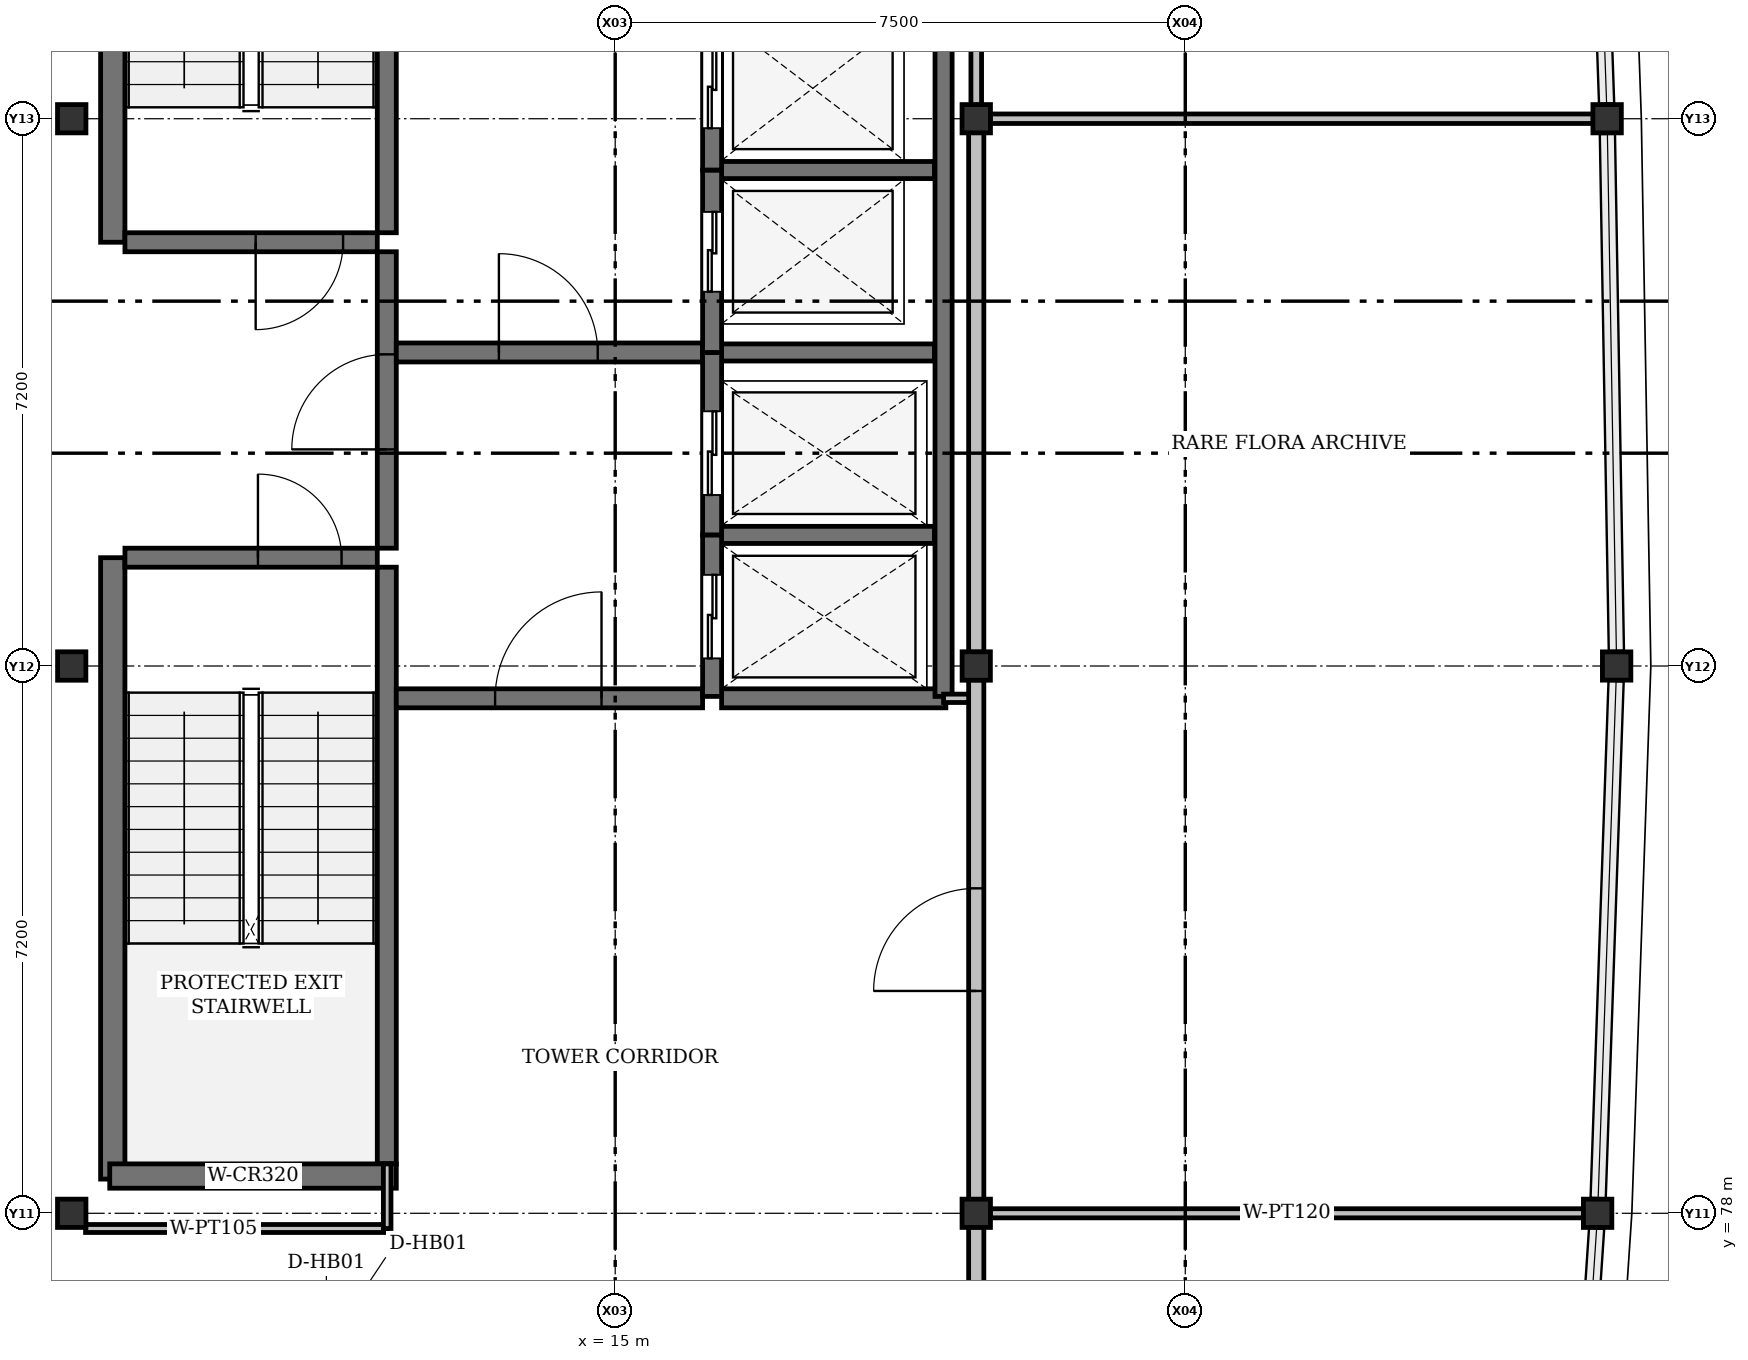
"""IFC4 building model, lengths in metres.
Left out: names, types, materials, properties, quantities, classifications, styles, units other than length and angle.
Written with IfcOpenShell. Run it as: python <this file> out.ifc"""

import sys

from ifc_helpers import new_model, si_unit, direction, frame, frame_2d, origin, origin_2d, place, context, subcontext, project, spatial, rectangle, i_section, extrude, element, fill, save


model = new_model("IFC4")
c1 = context("Model", 3, precision=1e-05, world=origin(), true_north=direction((0.0, 1.0)))
c2 = subcontext(c1, "Body", "Model", "MODEL_VIEW")
j1 = project(units=[si_unit("LENGTHUNIT", "METRE"), si_unit("PLANEANGLEUNIT", "RADIAN")], contexts=[c1])
p1 = place(None, origin())
s1 = spatial("IfcSite", under=j1, at=p1, CompositionType="ELEMENT")
p2 = place(p1, origin())
s2 = spatial("IfcBuilding", under=s1, at=p2, CompositionType="ELEMENT")
p3 = place(p2, frame((0.0, 0.0, 26.7)))
s3 = spatial("IfcBuildingStorey", under=s2, at=p3, CompositionType="ELEMENT", Elevation=26.7)
for number, where, z_axis, x_axis in (
    (1, (7.85, 78.0, 0.0), (0.0, 0.0, 1.0), (1.0, 0.0, 0.0)),
    (2, (19.75, 78.0, 0.0), (0.0, 0.0, 1.0), (1.0, 0.0, 0.0)),
    (3, (27.925, 78.0, 0.0), (0.0, 0.0, 1.0), (1.0, 0.0, 0.0)),
    (4, (7.85, 85.2, 0.0), (0.0, 0.0, 1.0), (0.0, 1.0, 0.0)),
    (5, (19.75, 85.2, 0.0), (0.0, 0.0, 1.0), (0.0, 1.0, 0.0)),
    (6, (28.175, 85.2, 0.0), (0.0, 0.0, 1.0), (1.0, 0.0, 0.0)),
    (7, (7.85, 92.4, 0.0), (0.0, 0.0, 1.0), (1.0, 0.0, 0.0)),
    (8, (19.75, 92.4, 0.0), (0.0, 0.0, 1.0), (1.0, 0.0, 0.0)),
    (9, (28.05, 92.4, 0.0), (0.0, 0.0, 1.0), (1.0, 0.0, 0.0)),
):
    element("IfcColumn", number, at=place(p3, frame(where, z_axis=z_axis, x_axis=x_axis)), inside=s3, PredefinedType="COLUMN", context=c2, shape_type="SweptSolid", body=[
        extrude(i_section(OverallWidth=0.374, OverallDepth=0.372, WebThickness=0.016, FlangeThickness=0.026, FilletRadius=0.015, at=origin_2d()), origin(), (0.0, 0.0, 1.0), 4.2),
    ])
for number, where, z_axis, x_axis in (
    (10, (8.39, 78.45, 0.0), (0.0, 0.0, 1.0), (0.0, 1.0, 0.0)),
    (11, (8.39, 90.775, 0.0), (0.0, 0.0, 1.0), (0.0, 1.0, 0.0)),
):
    element("IfcWall", number, at=place(p3, frame(where, z_axis=z_axis, x_axis=x_axis)), inside=s3, PredefinedType="SHEAR", context=c2, shape_type="SweptSolid", body=[
        extrude(rectangle(XDim=8.175, YDim=0.32, at=frame_2d((4.087, 0.0))), origin(), (0.0, 0.0, 1.0), 4.2),
    ])
for number, where, z_axis, x_axis in (
    (12, (11.995, 78.65, 0.0), (0.0, 0.0, 1.0), (0.0, 1.0, 0.0)),
    (13, (11.995, 90.9, 0.0), (0.0, 0.0, 1.0), (0.0, 1.0, 0.0)),
):
    element("IfcWall", number, at=place(p3, frame(where, z_axis=z_axis, x_axis=x_axis)), inside=s3, PredefinedType="SHEAR", context=c2, shape_type="SweptSolid", body=[
        extrude(rectangle(XDim=7.85, YDim=0.25, at=frame_2d((3.925, 0.0))), origin(), (0.0, 0.0, 1.0), 4.2),
    ])
p4 = place(p3, frame((11.995, 86.75, 0.0), z_axis=(0.0, 0.0, 1.0), x_axis=(0.0, 1.0, 0.0)))
e14 = element("IfcWall", 14, at=p4, inside=s3, PredefinedType="SHEAR", context=c2, shape_type="SweptSolid", body=[
    extrude(rectangle(XDim=3.9, YDim=0.25, at=frame_2d((1.95, 0.0))), origin(), (0.0, 0.0, 1.0), 4.2),
])
p5 = place(p4, frame((1.3, 0.0, 0.0)))
e15 = element("IfcOpeningElement", 15, at=p5, cuts=e14, PredefinedType="OPENING", context=c2, shape_type="SweptSolid", body=[
    extrude(rectangle(XDim=1.25, YDim=2.2, at=frame_2d((0.625, 1.1))), frame((0.0, 0.125, 0.0), z_axis=(0.0, -1.0, 0.0), x_axis=(1.0, 0.0, 0.0)), (0.0, 0.0, 1.0), 0.25),
])
p6 = place(p3, frame((8.35, 78.49, 0.0), z_axis=(0.0, 0.0, 1.0), x_axis=(1.0, 0.0, 0.0)))
e16 = element("IfcWall", 16, at=p6, inside=s3, PredefinedType="SHEAR", context=c2, shape_type="SweptSolid", body=[
    extrude(rectangle(XDim=3.77, YDim=0.32, at=frame_2d((1.885, 0.0))), origin(), (0.0, 0.0, 1.0), 4.2),
])
p7 = place(p3, frame((8.55, 86.625, 0.0), z_axis=(0.0, 0.0, 1.0), x_axis=(1.0, 0.0, 0.0)))
e17 = element("IfcWall", 17, at=p7, inside=s3, PredefinedType="SHEAR", context=c2, shape_type="SweptSolid", body=[
    extrude(rectangle(XDim=3.32, YDim=0.25, at=frame_2d((1.66, 0.0))), origin(), (0.0, 0.0, 1.0), 4.2),
])
p8 = place(p7, frame((1.75, 0.0, 0.0)))
e18 = element("IfcOpeningElement", 18, at=p8, cuts=e17, PredefinedType="OPENING", context=c2, shape_type="SweptSolid", body=[
    extrude(rectangle(XDim=1.1, YDim=2.15, at=frame_2d((0.55, 1.075))), frame((0.0, 0.125, 0.0), z_axis=(0.0, -1.0, 0.0), x_axis=(1.0, 0.0, 0.0)), (0.0, 0.0, 1.0), 0.25),
])
p9 = place(p3, frame((11.87, 90.775, 0.0), z_axis=(0.0, 0.0, 1.0), x_axis=(-1.0, 0.0, 0.0)))
e19 = element("IfcWall", 19, at=p9, inside=s3, PredefinedType="SHEAR", context=c2, shape_type="SweptSolid", body=[
    extrude(rectangle(XDim=3.32, YDim=0.25, at=frame_2d((1.66, 0.0))), origin(), (0.0, 0.0, 1.0), 4.2),
])
p10 = place(p9, frame((0.45, 0.0, 0.0)))
e20 = element("IfcOpeningElement", 20, at=p10, cuts=e19, PredefinedType="OPENING", context=c2, shape_type="SweptSolid", body=[
    extrude(rectangle(XDim=1.15, YDim=2.15, at=frame_2d((0.575, 1.075))), frame((0.0, 0.125, 0.0), z_axis=(0.0, -1.0, 0.0), x_axis=(1.0, 0.0, 0.0)), (0.0, 0.0, 1.0), 0.25),
])
p11 = place(p3, frame((12.12, 89.325, 0.0), z_axis=(0.0, 0.0, 1.0), x_axis=(1.0, 0.0, 0.0)))
e21 = element("IfcWall", 21, at=p11, inside=s3, PredefinedType="SHEAR", context=c2, shape_type="SweptSolid", body=[
    extrude(rectangle(XDim=4.03, YDim=0.25, at=frame_2d((2.015, 0.0))), origin(), (0.0, 0.0, 1.0), 4.2),
])
p12 = place(p11, frame((1.35, 0.0, 0.0)))
e22 = element("IfcOpeningElement", 22, at=p12, cuts=e21, PredefinedType="OPENING", context=c2, shape_type="SweptSolid", body=[
    extrude(rectangle(XDim=1.3, YDim=2.2, at=frame_2d((0.65, 1.1))), frame((0.0, 0.125, 0.0), z_axis=(0.0, -1.0, 0.0), x_axis=(1.0, 0.0, 0.0)), (0.0, 0.0, 1.0), 0.25),
])
p13 = place(p3, frame((12.12, 84.775, 0.0), z_axis=(0.0, 0.0, 1.0), x_axis=(1.0, 0.0, 0.0)))
e23 = element("IfcWall", 23, at=p13, inside=s3, PredefinedType="SHEAR", context=c2, shape_type="SweptSolid", body=[
    extrude(rectangle(XDim=4.03, YDim=0.25, at=frame_2d((2.015, 0.0))), origin(), (0.0, 0.0, 1.0), 4.2),
])
p14 = place(p13, frame((1.3, 0.0, 0.0)))
e24 = element("IfcOpeningElement", 24, at=p14, cuts=e23, PredefinedType="OPENING", context=c2, shape_type="SweptSolid", body=[
    extrude(rectangle(XDim=1.4, YDim=2.25, at=frame_2d((0.7, 1.125))), frame((0.0, 0.125, 0.0), z_axis=(0.0, -1.0, 0.0), x_axis=(1.0, 0.0, 0.0)), (0.0, 0.0, 1.0), 0.25),
])
p15 = place(p3, frame((16.4, 84.775, 0.0), z_axis=(0.0, 0.0, 1.0), x_axis=(1.0, 0.0, 0.0)))
e25 = element("IfcWall", 25, at=p15, inside=s3, PredefinedType="SHEAR", context=c2, shape_type="SweptSolid", body=[
    extrude(rectangle(XDim=2.95, YDim=0.25, at=frame_2d((1.475, 0.0))), origin(), (0.0, 0.0, 1.0), 4.2),
])
p16 = place(p3, frame((19.32, 84.8, 0.0), z_axis=(0.0, 0.0, 1.0), x_axis=(0.0, 1.0, 0.0)))
e26 = element("IfcWall", 26, at=p16, inside=s3, PredefinedType="SHEAR", context=c2, shape_type="SweptSolid", body=[
    extrude(rectangle(XDim=13.95, YDim=0.225, at=frame_2d((6.975, 0.0))), origin(), (0.0, 0.0, 1.0), 4.2),
])
for number, where, z_axis, x_axis in (
    (27, (16.4, 86.925, 0.0), (0.0, 0.0, 1.0), (1.0, 0.0, 0.0)),
    (28, (16.4, 89.325, 0.0), (0.0, 0.0, 1.0), (1.0, 0.0, 0.0)),
    (29, (16.4, 91.725, 0.0), (0.0, 0.0, 1.0), (1.0, 0.0, 0.0)),
):
    element("IfcWall", number, at=place(p3, frame(where, z_axis=z_axis, x_axis=x_axis)), inside=s3, PredefinedType="SHEAR", context=c2, shape_type="SweptSolid", body=[
        extrude(rectangle(XDim=2.8, YDim=0.225, at=frame_2d((1.4, 0.0))), origin(), (0.0, 0.0, 1.0), 4.2),
    ])
p17 = place(p3, frame((16.275, 84.8, 0.0), z_axis=(0.0, 0.0, 1.0), x_axis=(0.0, 1.0, 0.0)))
e30 = element("IfcWall", 30, at=p17, inside=s3, PredefinedType="SHEAR", context=c2, shape_type="SweptSolid", body=[
    extrude(rectangle(XDim=2.125, YDim=0.25, at=frame_2d((1.062, 0.0))), origin(), (0.0, 0.0, 1.0), 4.2),
])
p18 = place(p17, frame((0.5, 0.0, 0.0)))
e31 = element("IfcOpeningElement", 31, at=p18, cuts=e30, PredefinedType="OPENING", context=c2, shape_type="SweptSolid", body=[
    extrude(rectangle(XDim=1.1, YDim=2.15, at=frame_2d((0.55, 1.075))), frame((0.0, 0.125, 0.0), z_axis=(0.0, -1.0, 0.0), x_axis=(1.0, 0.0, 0.0)), (0.0, 0.0, 1.0), 0.25),
])
p19 = place(p3, frame((16.275, 86.925, 0.0), z_axis=(0.0, 0.0, 1.0), x_axis=(0.0, 1.0, 0.0)))
e32 = element("IfcWall", 32, at=p19, inside=s3, PredefinedType="SHEAR", context=c2, shape_type="SweptSolid", body=[
    extrude(rectangle(XDim=2.4, YDim=0.25, at=frame_2d((1.2, 0.0))), origin(), (0.0, 0.0, 1.0), 4.2),
])
p20 = place(p19, frame((0.525, 0.0, 0.0)))
e33 = element("IfcOpeningElement", 33, at=p20, cuts=e32, PredefinedType="OPENING", context=c2, shape_type="SweptSolid", body=[
    extrude(rectangle(XDim=1.1, YDim=2.15, at=frame_2d((0.55, 1.075))), frame((0.0, 0.125, 0.0), z_axis=(0.0, -1.0, 0.0), x_axis=(1.0, 0.0, 0.0)), (0.0, 0.0, 1.0), 0.25),
])
p21 = place(p3, frame((16.275, 89.325, 0.0), z_axis=(0.0, 0.0, 1.0), x_axis=(0.0, 1.0, 0.0)))
e34 = element("IfcWall", 34, at=p21, inside=s3, PredefinedType="SHEAR", context=c2, shape_type="SweptSolid", body=[
    extrude(rectangle(XDim=2.4, YDim=0.25, at=frame_2d((1.2, 0.0))), origin(), (0.0, 0.0, 1.0), 4.2),
])
p22 = place(p21, frame((0.8, 0.0, 0.0)))
e35 = element("IfcOpeningElement", 35, at=p22, cuts=e34, PredefinedType="OPENING", context=c2, shape_type="SweptSolid", body=[
    extrude(rectangle(XDim=1.05, YDim=2.15, at=frame_2d((0.525, 1.075))), frame((0.0, 0.125, 0.0), z_axis=(0.0, -1.0, 0.0), x_axis=(1.0, 0.0, 0.0)), (0.0, 0.0, 1.0), 0.25),
])
p23 = place(p3, frame((16.275, 91.725, 0.0), z_axis=(0.0, 0.0, 1.0), x_axis=(0.0, 1.0, 0.0)))
e36 = element("IfcWall", 36, at=p23, inside=s3, PredefinedType="SHEAR", context=c2, shape_type="SweptSolid", body=[
    extrude(rectangle(XDim=2.175, YDim=0.25, at=frame_2d((1.087, 0.0))), origin(), (0.0, 0.0, 1.0), 4.2),
])
p24 = place(p23, frame((0.55, 0.0, 0.0)))
e37 = element("IfcOpeningElement", 37, at=p24, cuts=e36, PredefinedType="OPENING", context=c2, shape_type="SweptSolid", body=[
    extrude(rectangle(XDim=1.05, YDim=2.15, at=frame_2d((0.525, 1.075))), frame((0.0, 0.125, 0.0), z_axis=(0.0, -1.0, 0.0), x_axis=(1.0, 0.0, 0.0)), (0.0, 0.0, 1.0), 0.25),
])
p25 = place(p3, frame((19.32, 84.775, 0.0), z_axis=(0.0, 0.0, 1.0), x_axis=(1.0, 0.0, 0.0)))
e38 = element("IfcWall", 38, at=p25, inside=s3, PredefinedType="PARTITIONING", context=c2, shape_type="SweptSolid", body=[
    extrude(rectangle(XDim=0.43, YDim=0.11, at=frame_2d((0.215, 0.0))), origin(), (0.0, 0.0, 1.0), 3.507),
])
p26 = place(p3, frame((8.032, 77.8, 0.0), z_axis=(0.0, 0.0, 1.0), x_axis=(1.0, 0.0, 0.0)))
e39 = element("IfcWall", 39, at=p26, inside=s3, PredefinedType="PARTITIONING", context=c2, shape_type="SweptSolid", body=[
    extrude(rectangle(XDim=3.968, YDim=0.105, at=frame_2d((1.984, 0.0))), origin(), (0.0, 0.0, 1.0), 3.277),
])
p27 = place(p3, frame((12.0, 77.8, 0.0), z_axis=(0.0, 0.0, 1.0), x_axis=(0.0, 1.0, 0.0)))
e40 = element("IfcWall", 40, at=p27, inside=s3, PredefinedType="PARTITIONING", context=c2, shape_type="SweptSolid", body=[
    extrude(rectangle(XDim=0.85, YDim=0.1, at=frame_2d((0.425, 0.0))), origin(), (0.0, 0.0, 1.0), 3.277),
])
p28 = place(p3, frame((19.75, 78.181, 0.0), z_axis=(0.0, 0.0, 1.0), x_axis=(0.0, 1.0, 0.0)))
e41 = element("IfcWall", 41, at=p28, inside=s3, PredefinedType="SOLIDWALL", context=c2, shape_type="SweptSolid", body=[
    extrude(rectangle(XDim=6.837, YDim=0.2, at=frame_2d((3.418, 0.0))), origin(), (0.0, 0.0, 1.0), 3.507),
])
p29 = place(p28, frame((2.744, 0.0, 0.0)))
e42 = element("IfcOpeningElement", 42, at=p29, cuts=e41, PredefinedType="OPENING", context=c2, shape_type="SweptSolid", body=[
    extrude(rectangle(XDim=1.35, YDim=2.25, at=frame_2d((0.675, 1.125))), frame((0.0, 0.1, 0.0), z_axis=(0.0, -1.0, 0.0), x_axis=(1.0, 0.0, 0.0)), (0.0, 0.0, 1.0), 0.2),
])
p30 = place(p3, frame((19.75, 85.382, 0.0), z_axis=(0.0, 0.0, 1.0), x_axis=(0.0, 1.0, 0.0)))
e43 = element("IfcWall", 43, at=p30, inside=s3, PredefinedType="SOLIDWALL", context=c2, shape_type="SweptSolid", body=[
    extrude(rectangle(XDim=6.837, YDim=0.2, at=frame_2d((3.418, 0.0))), origin(), (0.0, 0.0, 1.0), 3.507),
])
p31 = place(p3, frame((19.75, 92.581, 0.0), z_axis=(0.0, 0.0, 1.0), x_axis=(0.0, 1.0, 0.0)))
e44 = element("IfcWall", 44, at=p31, inside=s3, PredefinedType="PARTITIONING", context=c2, shape_type="SweptSolid", body=[
    extrude(rectangle(XDim=6.837, YDim=0.14, at=frame_2d((3.418, 0.0))), origin(), (0.0, 0.0, 1.0), 3.507),
])
p32 = place(p3, frame((27.868, 92.4, 0.0), z_axis=(0.0, 0.0, 1.0), x_axis=(-1.0, 0.0, 0.0)))
e45 = element("IfcWall", 45, at=p32, inside=s3, PredefinedType="PARTITIONING", context=c2, shape_type="SweptSolid", body=[
    extrude(rectangle(XDim=7.936, YDim=0.125, at=frame_2d((3.968, 0.0))), origin(), (0.0, 0.0, 1.0), 3.277),
])
p33 = place(p3, frame((27.743, 78.0, 0.0), z_axis=(0.0, 0.0, 1.0), x_axis=(-1.0, 0.0, 0.0)))
e46 = element("IfcWall", 46, at=p33, inside=s3, PredefinedType="PARTITIONING", context=c2, shape_type="SweptSolid", body=[
    extrude(rectangle(XDim=7.811, YDim=0.12, at=frame_2d((3.906, 0.0))), origin(), (0.0, 0.0, 1.0), 3.277),
])
p34 = place(p3, frame((19.75, 77.819, 0.0), z_axis=(0.0, 0.0, 1.0), x_axis=(0.0, -1.0, 0.0)))
e47 = element("IfcWall", 47, at=p34, inside=s3, PredefinedType="SOLIDWALL", context=c2, shape_type="SweptSolid", body=[
    extrude(rectangle(XDim=2.019, YDim=0.2, at=frame_2d((1.01, 0.0))), origin(), (0.0, 0.0, 1.0), 3.507),
])
p35 = place(p5, origin())
e48 = element("IfcDoor", 48, at=p35, inside=s3, OperationType="SINGLE_SWING_LEFT", PredefinedType="DOOR", context=c2, shape_type="SweptSolid", body=[
    extrude(rectangle(XDim=1.25, YDim=2.2, at=frame_2d((0.625, 1.1))), frame((0.0, 0.025, 0.0), z_axis=(0.0, -1.0, 0.0), x_axis=(1.0, 0.0, 0.0)), (0.0, 0.0, 1.0), 0.05),
])
fill(e15, e48)
p36 = place(p8, origin())
e49 = element("IfcDoor", 49, at=p36, inside=s3, OperationType="SINGLE_SWING_LEFT", PredefinedType="DOOR", context=c2, shape_type="SweptSolid", body=[
    extrude(rectangle(XDim=1.1, YDim=2.15, at=frame_2d((0.55, 1.075))), frame((0.0, 0.025, 0.0), z_axis=(0.0, -1.0, 0.0), x_axis=(1.0, 0.0, 0.0)), (0.0, 0.0, 1.0), 0.05),
])
fill(e18, e49)
p37 = place(p10, origin())
e50 = element("IfcDoor", 50, at=p37, inside=s3, OperationType="SINGLE_SWING_RIGHT", PredefinedType="DOOR", context=c2, shape_type="SweptSolid", body=[
    extrude(rectangle(XDim=1.15, YDim=2.15, at=frame_2d((0.575, 1.075))), frame((0.0, 0.025, 0.0), z_axis=(0.0, -1.0, 0.0), x_axis=(1.0, 0.0, 0.0)), (0.0, 0.0, 1.0), 0.05),
])
fill(e20, e50)
p38 = place(p12, origin())
e51 = element("IfcDoor", 51, at=p38, inside=s3, OperationType="SINGLE_SWING_LEFT", PredefinedType="DOOR", context=c2, shape_type="SweptSolid", body=[
    extrude(rectangle(XDim=1.3, YDim=2.2, at=frame_2d((0.65, 1.1))), frame((0.0, 0.025, 0.0), z_axis=(0.0, -1.0, 0.0), x_axis=(1.0, 0.0, 0.0)), (0.0, 0.0, 1.0), 0.05),
])
fill(e22, e51)
p39 = place(p14, origin())
e52 = element("IfcDoor", 52, at=p39, inside=s3, OperationType="SINGLE_SWING_RIGHT", PredefinedType="DOOR", context=c2, shape_type="SweptSolid", body=[
    extrude(rectangle(XDim=1.4, YDim=2.25, at=frame_2d((0.7, 1.125))), frame((0.0, 0.025, 0.0), z_axis=(0.0, -1.0, 0.0), x_axis=(1.0, 0.0, 0.0)), (0.0, 0.0, 1.0), 0.05),
])
fill(e24, e52)
p40 = place(p18, origin())
e53 = element("IfcDoor", 53, at=p40, inside=s3, OperationType="SLIDING_TO_LEFT", PredefinedType="DOOR", context=c2, shape_type="SweptSolid", body=[
    extrude(rectangle(XDim=1.1, YDim=2.15, at=frame_2d((0.55, 1.075))), frame((0.0, 0.025, 0.0), z_axis=(0.0, -1.0, 0.0), x_axis=(1.0, 0.0, 0.0)), (0.0, 0.0, 1.0), 0.05),
])
fill(e31, e53)
p41 = place(p20, origin())
e54 = element("IfcDoor", 54, at=p41, inside=s3, OperationType="SLIDING_TO_LEFT", PredefinedType="DOOR", context=c2, shape_type="SweptSolid", body=[
    extrude(rectangle(XDim=1.1, YDim=2.15, at=frame_2d((0.55, 1.075))), frame((0.0, 0.025, 0.0), z_axis=(0.0, -1.0, 0.0), x_axis=(1.0, 0.0, 0.0)), (0.0, 0.0, 1.0), 0.05),
])
fill(e33, e54)
p42 = place(p22, origin())
e55 = element("IfcDoor", 55, at=p42, inside=s3, OperationType="SLIDING_TO_LEFT", PredefinedType="DOOR", context=c2, shape_type="SweptSolid", body=[
    extrude(rectangle(XDim=1.05, YDim=2.15, at=frame_2d((0.525, 1.075))), frame((0.0, 0.025, 0.0), z_axis=(0.0, -1.0, 0.0), x_axis=(1.0, 0.0, 0.0)), (0.0, 0.0, 1.0), 0.05),
])
fill(e35, e55)
p43 = place(p24, origin())
e56 = element("IfcDoor", 56, at=p43, inside=s3, OperationType="SLIDING_TO_LEFT", PredefinedType="DOOR", context=c2, shape_type="SweptSolid", body=[
    extrude(rectangle(XDim=1.05, YDim=2.15, at=frame_2d((0.525, 1.075))), frame((0.0, 0.025, 0.0), z_axis=(0.0, -1.0, 0.0), x_axis=(1.0, 0.0, 0.0)), (0.0, 0.0, 1.0), 0.05),
])
fill(e37, e56)
p44 = place(p29, origin())
e57 = element("IfcDoor", 57, at=p44, inside=s3, OperationType="SINGLE_SWING_LEFT", PredefinedType="DOOR", context=c2, shape_type="SweptSolid", body=[
    extrude(rectangle(XDim=1.35, YDim=2.25, at=frame_2d((0.675, 1.125))), frame((0.0, 0.025, 0.0), z_axis=(0.0, -1.0, 0.0), x_axis=(1.0, 0.0, 0.0)), (0.0, 0.0, 1.0), 0.05),
])
fill(e42, e57)
save(model, sys.argv[1])
